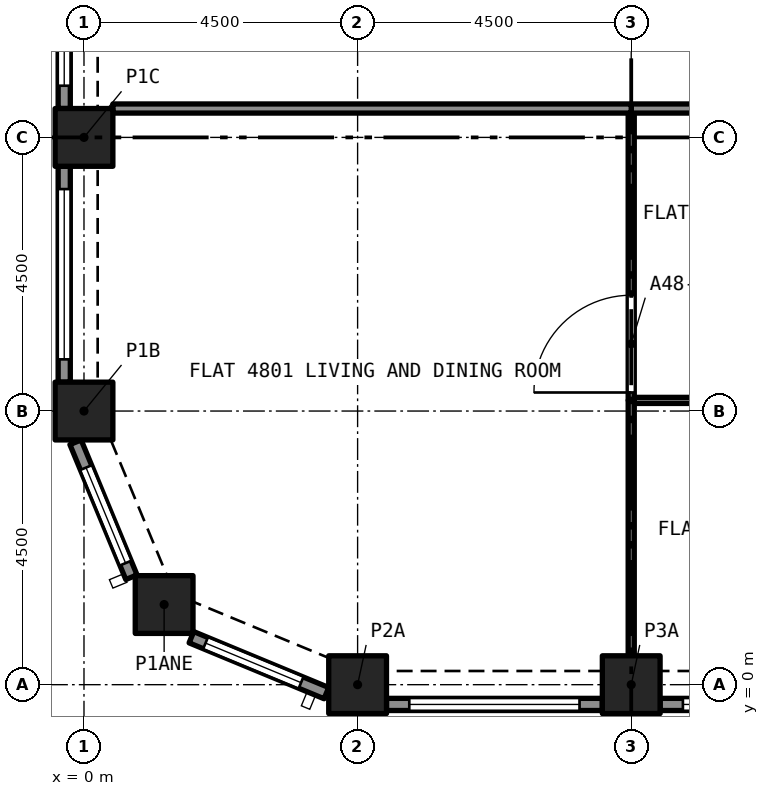
"""IFC4 building model, lengths in metres.
Left out: names, types, materials, properties, quantities, classifications, styles, units other than length and angle.
Written with IfcOpenShell. Run it as: python <this file> out.ifc"""

import sys

from ifc_helpers import new_model, si_unit, direction, frame, frame_2d, origin, origin_2d, place, context, subcontext, project, spatial, rectangle, extrude, element, fill, save


model = new_model("IFC4")
c1 = context("Model", 3, precision=1e-05, world=origin(), true_north=direction((0.0, 1.0)))
c2 = subcontext(c1, "Body", "Model", "MODEL_VIEW")
j1 = project(units=[si_unit("LENGTHUNIT", "METRE"), si_unit("PLANEANGLEUNIT", "RADIAN")], contexts=[c1])
p1 = place(None, origin())
s1 = spatial("IfcSite", under=j1, at=p1, CompositionType="ELEMENT")
p2 = place(p1, origin())
s2 = spatial("IfcBuilding", under=s1, at=p2, CompositionType="ELEMENT")
p3 = place(p2, frame((0.0, 0.0, 176.3)))
s3 = spatial("IfcBuildingStorey", under=s2, at=p3, CompositionType="ELEMENT", Elevation=176.3)
for number, where, z_axis, x_axis in (
    (1, (4.5, 0.0, 0.0), (0.0, 0.0, 1.0), (1.0, 0.0, 0.0)),
    (2, (9.0, 0.0, 0.0), (0.0, 0.0, 1.0), (1.0, 0.0, 0.0)),
    (3, (1.318, 1.318, 0.0), (0.0, 0.0, 1.0), (1.0, 0.0, 0.0)),
    (4, (0.0, 4.5, 0.0), (0.0, 0.0, 1.0), (1.0, 0.0, 0.0)),
    (5, (0.0, 9.0, 0.0), (0.0, 0.0, 1.0), (1.0, 0.0, 0.0)),
):
    element("IfcColumn", number, at=place(p3, frame(where, z_axis=z_axis, x_axis=x_axis)), inside=s3, PredefinedType="COLUMN", context=c2, shape_type="SweptSolid", body=[
        extrude(rectangle(XDim=0.95, YDim=0.95, at=origin_2d()), origin(), (0.0, 0.0, 1.0), 3.2),
    ])
p4 = place(p3, frame((-0.325, 9.475, 0.0), z_axis=(0.0, 0.0, 1.0), x_axis=(0.0, 1.0, 0.0)))
e6 = element("IfcWall", 6, at=p4, inside=s3, PredefinedType="SOLIDWALL", context=c2, shape_type="SweptSolid", body=[
    extrude(rectangle(XDim=3.55, YDim=0.2, at=frame_2d((1.775, 0.0))), origin(), (0.0, 0.0, 1.0), 3.2),
])
p5 = place(p4, frame((0.375, 0.0, 0.45)))
e7 = element("IfcOpeningElement", 7, at=p5, cuts=e6, PredefinedType="OPENING", context=c2, shape_type="SweptSolid", body=[
    extrude(rectangle(XDim=2.8, YDim=1.95, at=frame_2d((1.4, 0.975))), frame((0.0, 0.11, 0.0), z_axis=(0.0, -1.0, 0.0), x_axis=(1.0, 0.0, 0.0)), (0.0, 0.0, 1.0), 0.22),
])
p6 = place(p3, frame((-0.325, 4.975, 0.0), z_axis=(0.0, 0.0, 1.0), x_axis=(0.0, 1.0, 0.0)))
e8 = element("IfcWall", 8, at=p6, inside=s3, PredefinedType="SOLIDWALL", context=c2, shape_type="SweptSolid", body=[
    extrude(rectangle(XDim=3.55, YDim=0.2, at=frame_2d((1.775, 0.0))), origin(), (0.0, 0.0, 1.0), 3.2),
])
p7 = place(p6, frame((0.375, 0.0, 0.45)))
e9 = element("IfcOpeningElement", 9, at=p7, cuts=e8, PredefinedType="OPENING", context=c2, shape_type="SweptSolid", body=[
    extrude(rectangle(XDim=2.8, YDim=1.95, at=frame_2d((1.4, 0.975))), frame((0.0, 0.11, 0.0), z_axis=(0.0, -1.0, 0.0), x_axis=(1.0, 0.0, 0.0)), (0.0, 0.0, 1.0), 0.22),
])
p8 = place(p3, frame((0.78, 1.767, 0.0), z_axis=(0.0, 0.0, 1.0), x_axis=(-0.382680855588, 0.923880599843, 0.0)))
e10 = element("IfcWall", 10, at=p8, inside=s3, PredefinedType="SOLIDWALL", context=c2, shape_type="SweptSolid", body=[
    extrude(rectangle(XDim=2.403, YDim=0.2, at=frame_2d((1.201, 0.0))), origin(), (0.0, 0.0, 1.0), 3.2),
])
p9 = place(p8, frame((0.251, 0.0, 0.45)))
e11 = element("IfcOpeningElement", 11, at=p9, cuts=e10, PredefinedType="OPENING", context=c2, shape_type="SweptSolid", body=[
    extrude(rectangle(XDim=1.7, YDim=1.95, at=frame_2d((0.85, 0.975))), frame((0.0, 0.11, 0.0), z_axis=(0.0, -1.0, 0.0), x_axis=(1.0, 0.0, 0.0)), (0.0, 0.0, 1.0), 0.22),
])
p10 = place(p3, frame((3.987, -0.139, 0.0), z_axis=(0.0, 0.0, 1.0), x_axis=(-0.923880599843, 0.382680855588, 0.0)))
e12 = element("IfcWall", 12, at=p10, inside=s3, PredefinedType="SOLIDWALL", context=c2, shape_type="SweptSolid", body=[
    extrude(rectangle(XDim=2.403, YDim=0.2, at=frame_2d((1.201, 0.0))), origin(), (0.0, 0.0, 1.0), 3.2),
])
p11 = place(p10, frame((0.451, 0.0, 0.45)))
e13 = element("IfcOpeningElement", 13, at=p11, cuts=e12, PredefinedType="OPENING", context=c2, shape_type="SweptSolid", body=[
    extrude(rectangle(XDim=1.7, YDim=1.95, at=frame_2d((0.85, 0.975))), frame((0.0, 0.11, 0.0), z_axis=(0.0, -1.0, 0.0), x_axis=(1.0, 0.0, 0.0)), (0.0, 0.0, 1.0), 0.22),
])
p12 = place(p3, frame((8.525, -0.325, 0.0), z_axis=(0.0, 0.0, 1.0), x_axis=(-1.0, 0.0, 0.0)))
e14 = element("IfcWall", 14, at=p12, inside=s3, PredefinedType="SOLIDWALL", context=c2, shape_type="SweptSolid", body=[
    extrude(rectangle(XDim=3.55, YDim=0.2, at=frame_2d((1.775, 0.0))), origin(), (0.0, 0.0, 1.0), 3.2),
])
p13 = place(p12, frame((0.375, 0.0, 0.45)))
e15 = element("IfcOpeningElement", 15, at=p13, cuts=e14, PredefinedType="OPENING", context=c2, shape_type="SweptSolid", body=[
    extrude(rectangle(XDim=2.8, YDim=1.95, at=frame_2d((1.4, 0.975))), frame((0.0, 0.11, 0.0), z_axis=(0.0, -1.0, 0.0), x_axis=(1.0, 0.0, 0.0)), (0.0, 0.0, 1.0), 0.22),
])
p14 = place(p3, frame((13.025, -0.325, 0.0), z_axis=(0.0, 0.0, 1.0), x_axis=(-1.0, 0.0, 0.0)))
e16 = element("IfcWall", 16, at=p14, inside=s3, PredefinedType="SOLIDWALL", context=c2, shape_type="SweptSolid", body=[
    extrude(rectangle(XDim=3.55, YDim=0.2, at=frame_2d((1.775, 0.0))), origin(), (0.0, 0.0, 1.0), 3.2),
])
p15 = place(p14, frame((0.375, 0.0, 0.45)))
e17 = element("IfcOpeningElement", 17, at=p15, cuts=e16, PredefinedType="OPENING", context=c2, shape_type="SweptSolid", body=[
    extrude(rectangle(XDim=2.8, YDim=1.95, at=frame_2d((1.4, 0.975))), frame((0.0, 0.11, 0.0), z_axis=(0.0, -1.0, 0.0), x_axis=(1.0, 0.0, 0.0)), (0.0, 0.0, 1.0), 0.22),
])
p16 = place(p3, frame((13.5, 4.675, 0.0), z_axis=(0.0, 0.0, 1.0), x_axis=(-1.0, 0.0, 0.0)))
e18 = element("IfcWall", 18, at=p16, inside=s3, PredefinedType="PARTITIONING", context=c2, shape_type="SweptSolid", body=[
    extrude(rectangle(XDim=4.45, YDim=0.1, at=frame_2d((2.225, 0.0))), origin(), (0.0, 0.0, 1.0), 2.9),
])
p17 = place(p16, frame((1.8, 0.0, 0.0)))
e19 = element("IfcOpeningElement", 19, at=p17, cuts=e18, PredefinedType="OPENING", context=c2, shape_type="SweptSolid", body=[
    extrude(rectangle(XDim=0.9, YDim=2.1, at=frame_2d((0.45, 1.05))), frame((0.0, 0.06, 0.0), z_axis=(0.0, -1.0, 0.0), x_axis=(1.0, 0.0, 0.0)), (0.0, 0.0, 1.0), 0.12),
])
p18 = place(p3, frame((9.0, 0.475, 0.0), z_axis=(0.0, 0.0, 1.0), x_axis=(0.0, 1.0, 0.0)))
e20 = element("IfcWall", 20, at=p18, inside=s3, PredefinedType="PARTITIONING", context=c2, shape_type="SweptSolid", body=[
    extrude(rectangle(XDim=4.2, YDim=0.1, at=frame_2d((2.1, 0.0))), origin(), (0.0, 0.0, 1.0), 2.9),
])
p19 = place(p3, frame((9.0, 4.675, 0.0), z_axis=(0.0, 0.0, 1.0), x_axis=(0.0, 1.0, 0.0)))
e21 = element("IfcWall", 21, at=p19, inside=s3, PredefinedType="PARTITIONING", context=c2, shape_type="SweptSolid", body=[
    extrude(rectangle(XDim=4.725, YDim=0.1, at=frame_2d((2.362, 0.0))), origin(), (0.0, 0.0, 1.0), 2.9),
])
p20 = place(p19, frame((0.13, 0.0, 0.0)))
e22 = element("IfcOpeningElement", 22, at=p20, cuts=e21, PredefinedType="OPENING", context=c2, shape_type="SweptSolid", body=[
    extrude(rectangle(XDim=1.6, YDim=2.1, at=frame_2d((0.8, 1.05))), frame((0.0, 0.06, 0.0), z_axis=(0.0, -1.0, 0.0), x_axis=(1.0, 0.0, 0.0)), (0.0, 0.0, 1.0), 0.12),
])
p21 = place(p3, frame((12.05, 9.475, 0.0), z_axis=(0.0, 0.0, 1.0), x_axis=(-1.0, 0.0, 0.0)))
e23 = element("IfcWall", 23, at=p21, inside=s3, PredefinedType="PARTITIONING", context=c2, shape_type="SweptSolid", body=[
    extrude(rectangle(XDim=3.05, YDim=0.15, at=frame_2d((1.525, 0.0))), origin(), (0.0, 0.0, 1.0), 2.9),
])
p22 = place(p21, frame((0.2, 0.0, 0.0)))
e24 = element("IfcOpeningElement", 24, at=p22, cuts=e23, PredefinedType="OPENING", context=c2, shape_type="SweptSolid", body=[
    extrude(rectangle(XDim=1.2, YDim=2.4, at=frame_2d((0.6, 1.2))), frame((0.0, 0.085, 0.0), z_axis=(0.0, -1.0, 0.0), x_axis=(1.0, 0.0, 0.0)), (0.0, 0.0, 1.0), 0.17),
])
p23 = place(p3, frame((0.475, 9.475, 0.0), z_axis=(0.0, 0.0, 1.0), x_axis=(1.0, 0.0, 0.0)))
e25 = element("IfcWall", 25, at=p23, inside=s3, PredefinedType="PARTITIONING", context=c2, shape_type="SweptSolid", body=[
    extrude(rectangle(XDim=8.525, YDim=0.15, at=frame_2d((4.262, 0.0))), origin(), (0.0, 0.0, 1.0), 2.9),
])
p24 = place(p5, origin())
e26 = element("IfcWindow", 26, at=p24, inside=s3, PartitioningType="SINGLE_PANEL", PredefinedType="WINDOW", context=c2, shape_type="SweptSolid", body=[
    extrude(rectangle(XDim=2.8, YDim=1.95, at=frame_2d((1.4, 0.975))), frame((0.0, 0.03, 0.0), z_axis=(0.0, -1.0, 0.0), x_axis=(1.0, 0.0, 0.0)), (0.0, 0.0, 1.0), 0.06),
])
fill(e7, e26)
p25 = place(p7, origin())
e27 = element("IfcWindow", 27, at=p25, inside=s3, PartitioningType="SINGLE_PANEL", PredefinedType="WINDOW", context=c2, shape_type="SweptSolid", body=[
    extrude(rectangle(XDim=2.8, YDim=1.95, at=frame_2d((1.4, 0.975))), frame((0.0, 0.03, 0.0), z_axis=(0.0, -1.0, 0.0), x_axis=(1.0, 0.0, 0.0)), (0.0, 0.0, 1.0), 0.06),
])
fill(e9, e27)
p26 = place(p9, origin())
e28 = element("IfcWindow", 28, at=p26, inside=s3, PartitioningType="SINGLE_PANEL", PredefinedType="WINDOW", context=c2, shape_type="SweptSolid", body=[
    extrude(rectangle(XDim=1.7, YDim=1.95, at=frame_2d((0.85, 0.975))), frame((0.0, 0.03, 0.0), z_axis=(0.0, -1.0, 0.0), x_axis=(1.0, 0.0, 0.0)), (0.0, 0.0, 1.0), 0.06),
])
fill(e11, e28)
p27 = place(p11, origin())
e29 = element("IfcWindow", 29, at=p27, inside=s3, PartitioningType="SINGLE_PANEL", PredefinedType="WINDOW", context=c2, shape_type="SweptSolid", body=[
    extrude(rectangle(XDim=1.7, YDim=1.95, at=frame_2d((0.85, 0.975))), frame((0.0, 0.03, 0.0), z_axis=(0.0, -1.0, 0.0), x_axis=(1.0, 0.0, 0.0)), (0.0, 0.0, 1.0), 0.06),
])
fill(e13, e29)
p28 = place(p13, origin())
e30 = element("IfcWindow", 30, at=p28, inside=s3, PartitioningType="SINGLE_PANEL", PredefinedType="WINDOW", context=c2, shape_type="SweptSolid", body=[
    extrude(rectangle(XDim=2.8, YDim=1.95, at=frame_2d((1.4, 0.975))), frame((0.0, 0.03, 0.0), z_axis=(0.0, -1.0, 0.0), x_axis=(1.0, 0.0, 0.0)), (0.0, 0.0, 1.0), 0.06),
])
fill(e15, e30)
p29 = place(p15, origin())
e31 = element("IfcWindow", 31, at=p29, inside=s3, PartitioningType="SINGLE_PANEL", PredefinedType="WINDOW", context=c2, shape_type="SweptSolid", body=[
    extrude(rectangle(XDim=2.8, YDim=1.95, at=frame_2d((1.4, 0.975))), frame((0.0, 0.03, 0.0), z_axis=(0.0, -1.0, 0.0), x_axis=(1.0, 0.0, 0.0)), (0.0, 0.0, 1.0), 0.06),
])
fill(e17, e31)
p30 = place(p20, origin())
e32 = element("IfcDoor", 32, at=p30, inside=s3, OperationType="SINGLE_SWING_LEFT", PredefinedType="DOOR", context=c2, shape_type="SweptSolid", body=[
    extrude(rectangle(XDim=1.6, YDim=2.1, at=frame_2d((0.8, 1.05))), frame((0.0, 0.025, 0.0), z_axis=(0.0, -1.0, 0.0), x_axis=(1.0, 0.0, 0.0)), (0.0, 0.0, 1.0), 0.05),
])
fill(e22, e32)
save(model, sys.argv[1])
